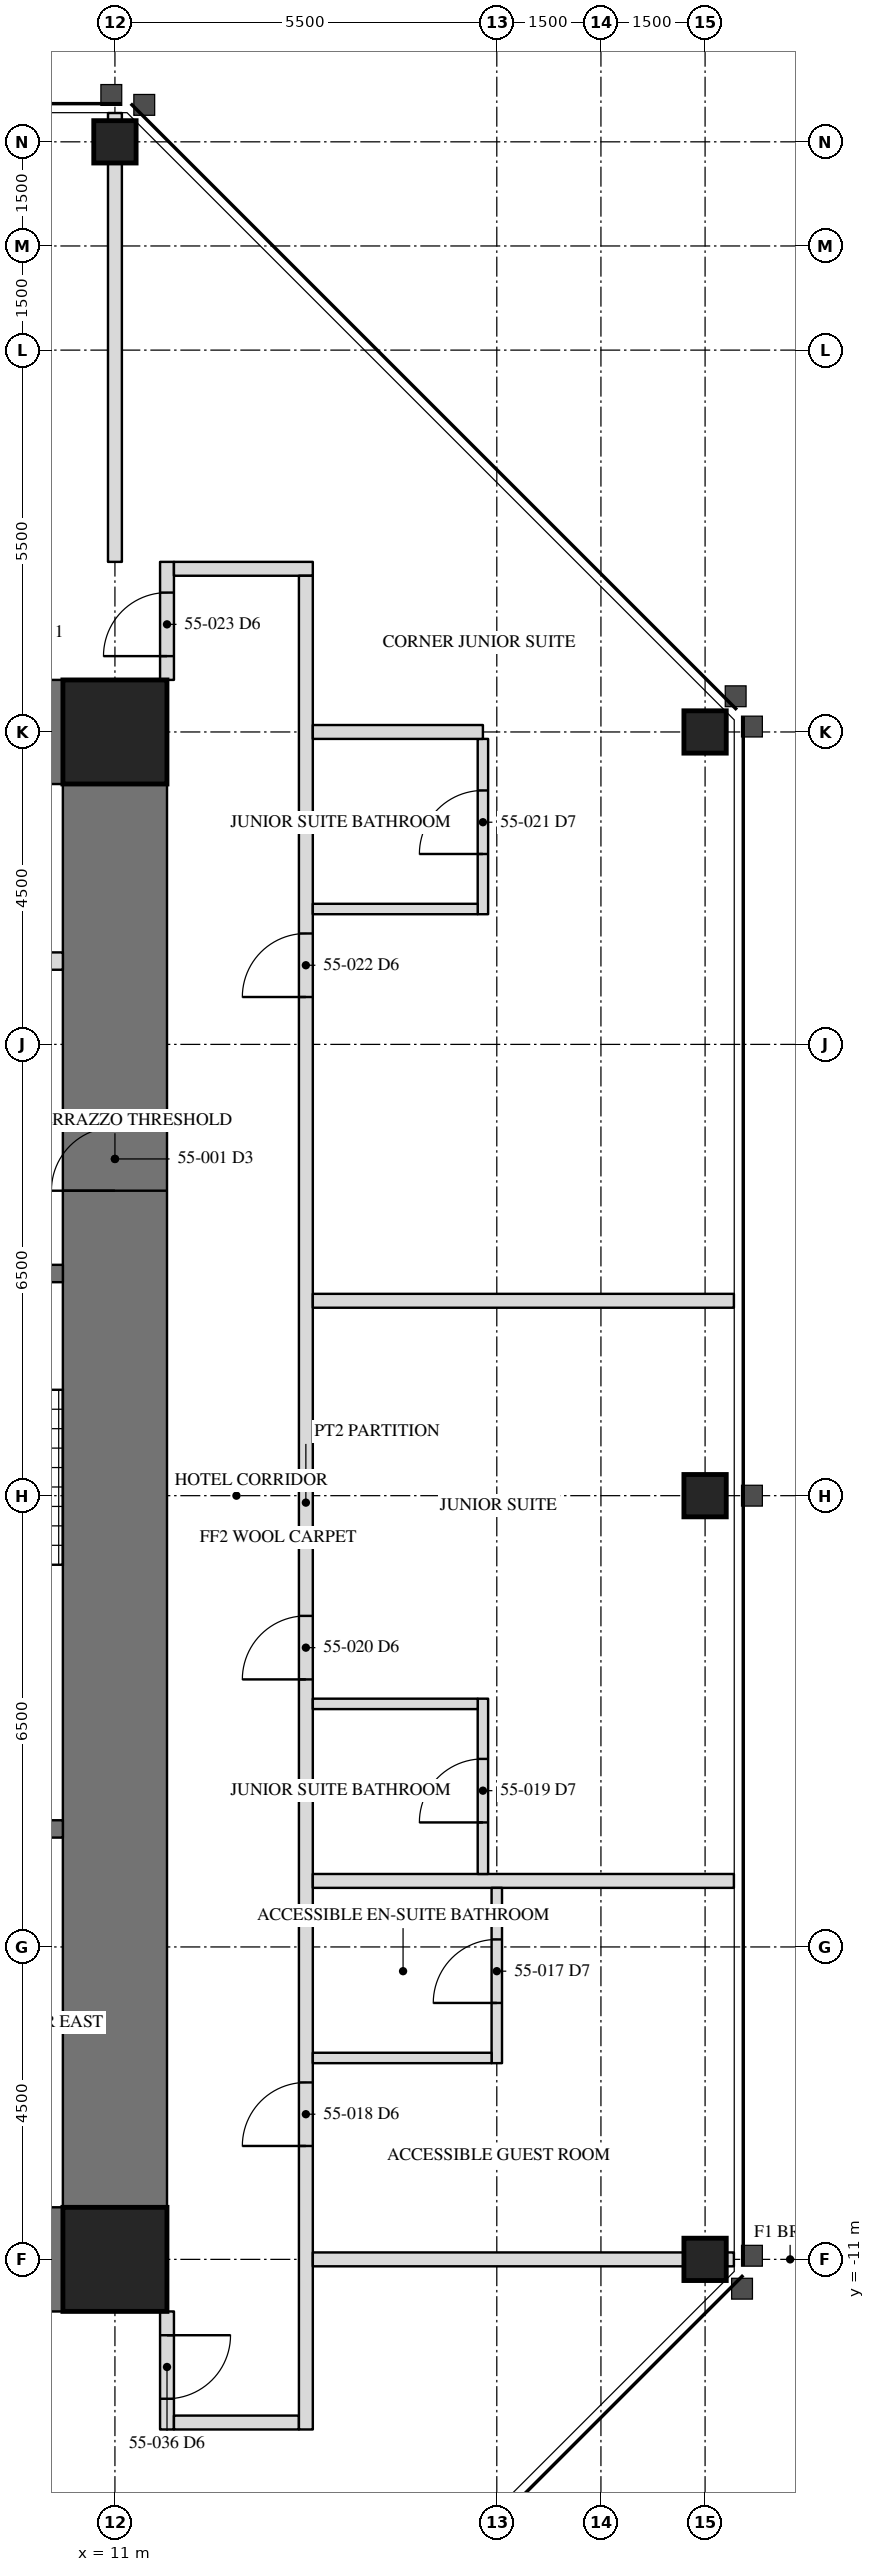
"""IFC4 building model, lengths in metres.
Left out: names, types, materials, properties, quantities, classifications, styles, units other than length and angle.
Written with IfcOpenShell. Run it as: python <this file> out.ifc"""

import sys

from ifc_helpers import new_model, si_unit, direction, frame, frame_2d, origin, origin_2d, place, context, subcontext, project, spatial, rectangle, hollow_rectangle, extrude, element, fill, save


model = new_model("IFC4")
c1 = context("Model", 3, precision=1e-05, world=origin(), true_north=direction((0.0, 1.0)))
c2 = subcontext(c1, "Body", "Model", "MODEL_VIEW")
j1 = project(units=[si_unit("LENGTHUNIT", "METRE"), si_unit("PLANEANGLEUNIT", "RADIAN")], contexts=[c1])
p1 = place(None, origin())
s1 = spatial("IfcSite", under=j1, at=p1, CompositionType="ELEMENT")
p2 = place(p1, origin())
s2 = spatial("IfcBuilding", under=s1, at=p2, CompositionType="ELEMENT")
p3 = place(p2, frame((0.0, 0.0, 229.2)))
s3 = spatial("IfcBuildingStorey", under=s2, at=p3, CompositionType="ELEMENT", Elevation=229.2)
for number, where, z_axis, x_axis in (
    (1, (19.5, -11.0, 0.0), (0.0, 0.0, 1.0), (0.0, 1.0, 0.0)),
    (2, (19.5, 0.0, 0.0), (0.0, 0.0, 1.0), (0.0, 1.0, 0.0)),
    (3, (19.5, 11.0, 0.0), (0.0, 0.0, 1.0), (0.0, 1.0, 0.0)),
    (4, (11.0, 19.5, 0.0), (0.0, 0.0, 1.0), (1.0, 0.0, 0.0)),
):
    element("IfcColumn", number, at=place(p3, frame(where, z_axis=z_axis, x_axis=x_axis)), inside=s3, PredefinedType="COLUMN", context=c2, shape_type="SweptSolid", body=[
        extrude(hollow_rectangle(XDim=0.61, YDim=0.61, WallThickness=0.076, at=origin_2d()), origin(), (0.0, 0.0, 1.0), 3.5),
    ])
p4 = place(p3, frame((11.0, -11.0, 0.0), z_axis=(0.0, 0.0, 1.0), x_axis=(0.0, 1.0, 0.0)))
e5 = element("IfcWall", 5, at=p4, inside=s3, PredefinedType="SHEAR", context=c2, shape_type="SweptSolid", body=[
    extrude(rectangle(XDim=22.0, YDim=1.5, at=frame_2d((11.0, 0.0))), origin(), (0.0, 0.0, 1.0), 3.5),
])
p5 = place(p4, frame((15.393, 0.0, 0.0)))
e6 = element("IfcOpeningElement", 6, at=p5, cuts=e5, PredefinedType="OPENING", context=c2, shape_type="SweptSolid", body=[
    extrude(rectangle(XDim=0.915, YDim=2.134, at=frame_2d((0.458, 1.067))), frame((0.0, 0.76, 0.0), z_axis=(0.0, -1.0, 0.0), x_axis=(1.0, 0.0, 0.0)), (0.0, 0.0, 1.0), 1.52),
])
for number, where, z_axis, x_axis in (
    (7, (11.0, 11.0, 0.0), (0.0, 0.0, 1.0), (-1.0, 0.0, 0.0)),
    (8, (6.5, -11.0, 0.0), (0.0, 0.0, 1.0), (1.0, 0.0, 0.0)),
):
    element("IfcWall", number, at=place(p3, frame(where, z_axis=z_axis, x_axis=x_axis)), inside=s3, PredefinedType="SHEAR", context=c2, shape_type="SweptSolid", body=[
        extrude(rectangle(XDim=4.5, YDim=1.5, at=frame_2d((2.25, 0.0))), origin(), (0.0, 0.0, 1.0), 3.5),
    ])
for number, where, z_axis, x_axis in (
    (9, (11.0, 11.0, 0.0), (0.0, 0.0, 1.0), (1.0, 0.0, 0.0)),
    (10, (11.0, -11.0, 0.0), (0.0, 0.0, 1.0), (1.0, 0.0, 0.0)),
):
    element("IfcColumn", number, at=place(p3, frame(where, z_axis=z_axis, x_axis=x_axis)), inside=s3, PredefinedType="COLUMN", context=c2, shape_type="SweptSolid", body=[
        extrude(hollow_rectangle(XDim=1.499, YDim=1.499, WallThickness=0.102, at=origin_2d()), origin(), (0.0, 0.0, 1.0), 3.5),
    ])
p6 = place(p3, frame((6.95, -4.8, 0.0), z_axis=(0.0, 0.0, 1.0), x_axis=(1.0, 0.0, 0.0)))
e11 = element("IfcWall", 11, at=p6, inside=s3, PredefinedType="SOLIDWALL", context=c2, shape_type="SweptSolid", body=[
    extrude(rectangle(XDim=3.3, YDim=0.25, at=frame_2d((1.65, 0.0))), origin(), (0.0, 0.0, 1.0), 3.31),
])
p7 = place(p3, frame((6.95, 3.2, 0.0), z_axis=(0.0, 0.0, 1.0), x_axis=(1.0, 0.0, 0.0)))
e12 = element("IfcWall", 12, at=p7, inside=s3, PredefinedType="SOLIDWALL", context=c2, shape_type="SweptSolid", body=[
    extrude(rectangle(XDim=3.3, YDim=0.25, at=frame_2d((1.65, 0.0))), origin(), (0.0, 0.0, 1.0), 3.31),
])
p8 = place(p7, frame((1.116, 0.0, 0.0)))
e13 = element("IfcOpeningElement", 13, at=p8, cuts=e12, PredefinedType="OPENING", context=c2, shape_type="SweptSolid", body=[
    extrude(rectangle(XDim=1.067, YDim=2.134, at=frame_2d((0.533, 1.067))), frame((0.0, 0.135, 0.0), z_axis=(0.0, -1.0, 0.0), x_axis=(1.0, 0.0, 0.0)), (0.0, 0.0, 1.0), 0.27),
])
p9 = place(p3, frame((6.95, 7.7, 0.0), z_axis=(0.0, 0.0, 1.0), x_axis=(1.0, 0.0, 0.0)))
e14 = element("IfcWall", 14, at=p9, inside=s3, PredefinedType="PARTITIONING", context=c2, shape_type="SweptSolid", body=[
    extrude(rectangle(XDim=3.3, YDim=0.25, at=frame_2d((1.65, 0.0))), origin(), (0.0, 0.0, 1.0), 3.31),
])
p10 = place(p9, frame((0.45, 0.0, 0.0)))
e15 = element("IfcOpeningElement", 15, at=p10, cuts=e14, PredefinedType="OPENING", context=c2, shape_type="SweptSolid", body=[
    extrude(rectangle(XDim=1.219, YDim=2.134, at=frame_2d((0.609, 1.067))), frame((0.0, 0.135, 0.0), z_axis=(0.0, -1.0, 0.0), x_axis=(1.0, 0.0, 0.0)), (0.0, 0.0, 1.0), 0.27),
])
p11 = place(p3, frame((11.75, 11.75, 0.0), z_axis=(0.0, 0.0, 1.0), x_axis=(0.0, 1.0, 0.0)))
e16 = element("IfcWall", 16, at=p11, inside=s3, PredefinedType="PARTITIONING", context=c2, shape_type="SweptSolid", body=[
    extrude(rectangle(XDim=1.7, YDim=0.2, at=frame_2d((0.85, 0.0))), origin(), (0.0, 0.0, 1.0), 3.31),
])
p12 = place(p11, frame((0.343, 0.0, 0.0)))
e17 = element("IfcOpeningElement", 17, at=p12, cuts=e16, PredefinedType="OPENING", context=c2, shape_type="SweptSolid", body=[
    extrude(rectangle(XDim=0.915, YDim=2.134, at=frame_2d((0.458, 1.067))), frame((0.0, 0.11, 0.0), z_axis=(0.0, -1.0, 0.0), x_axis=(1.0, 0.0, 0.0)), (0.0, 0.0, 1.0), 0.22),
])
p13 = place(p3, frame((13.85, 13.35, 0.0), z_axis=(0.0, 0.0, 1.0), x_axis=(-1.0, 0.0, 0.0)))
e18 = element("IfcWall", 18, at=p13, inside=s3, PredefinedType="PARTITIONING", context=c2, shape_type="SweptSolid", body=[
    extrude(rectangle(XDim=2.0, YDim=0.2, at=frame_2d((1.0, 0.0))), origin(), (0.0, 0.0, 1.0), 3.31),
])
p14 = place(p3, frame((11.75, -11.75, 0.0), z_axis=(0.0, 0.0, 1.0), x_axis=(0.0, -1.0, 0.0)))
e19 = element("IfcWall", 19, at=p14, inside=s3, PredefinedType="PARTITIONING", context=c2, shape_type="SweptSolid", body=[
    extrude(rectangle(XDim=1.7, YDim=0.2, at=frame_2d((0.85, 0.0))), origin(), (0.0, 0.0, 1.0), 3.31),
])
p15 = place(p14, frame((0.343, 0.0, 0.0)))
e20 = element("IfcOpeningElement", 20, at=p15, cuts=e19, PredefinedType="OPENING", context=c2, shape_type="SweptSolid", body=[
    extrude(rectangle(XDim=0.915, YDim=2.134, at=frame_2d((0.458, 1.067))), frame((0.0, 0.11, 0.0), z_axis=(0.0, -1.0, 0.0), x_axis=(1.0, 0.0, 0.0)), (0.0, 0.0, 1.0), 0.22),
])
p16 = place(p3, frame((11.85, -13.35, 0.0), z_axis=(0.0, 0.0, 1.0), x_axis=(1.0, 0.0, 0.0)))
e21 = element("IfcWall", 21, at=p16, inside=s3, PredefinedType="PARTITIONING", context=c2, shape_type="SweptSolid", body=[
    extrude(rectangle(XDim=1.8, YDim=0.2, at=frame_2d((0.9, 0.0))), origin(), (0.0, 0.0, 1.0), 3.31),
])
p17 = place(p3, frame((13.75, -13.45, 0.0), z_axis=(0.0, 0.0, 1.0), x_axis=(0.0, 1.0, 0.0)))
e22 = element("IfcWall", 22, at=p17, inside=s3, PredefinedType="PARTITIONING", context=c2, shape_type="SweptSolid", body=[
    extrude(rectangle(XDim=26.7, YDim=0.2, at=frame_2d((13.35, 0.0))), origin(), (0.0, 0.0, 1.0), 3.31),
])
p18 = place(p17, frame((4.083, 0.0, 0.0)))
e23 = element("IfcOpeningElement", 23, at=p18, cuts=e22, PredefinedType="OPENING", context=c2, shape_type="SweptSolid", body=[
    extrude(rectangle(XDim=0.915, YDim=2.134, at=frame_2d((0.458, 1.067))), frame((0.0, 0.11, 0.0), z_axis=(0.0, -1.0, 0.0), x_axis=(1.0, 0.0, 0.0)), (0.0, 0.0, 1.0), 0.22),
])
p19 = place(p17, frame((10.803, 0.0, 0.0)))
e24 = element("IfcOpeningElement", 24, at=p19, cuts=e22, PredefinedType="OPENING", context=c2, shape_type="SweptSolid", body=[
    extrude(rectangle(XDim=0.915, YDim=2.134, at=frame_2d((0.458, 1.067))), frame((0.0, 0.11, 0.0), z_axis=(0.0, -1.0, 0.0), x_axis=(1.0, 0.0, 0.0)), (0.0, 0.0, 1.0), 0.22),
])
p20 = place(p17, frame((20.633, 0.0, 0.0)))
e25 = element("IfcOpeningElement", 25, at=p20, cuts=e22, PredefinedType="OPENING", context=c2, shape_type="SweptSolid", body=[
    extrude(rectangle(XDim=0.915, YDim=2.134, at=frame_2d((0.458, 1.067))), frame((0.0, 0.11, 0.0), z_axis=(0.0, -1.0, 0.0), x_axis=(1.0, 0.0, 0.0)), (0.0, 0.0, 1.0), 0.22),
])
p21 = place(p3, frame((13.85, -11.0, 0.0), z_axis=(0.0, 0.0, 1.0), x_axis=(1.0, 0.0, 0.0)))
e26 = element("IfcWall", 26, at=p21, inside=s3, PredefinedType="PARTITIONING", context=c2, shape_type="SweptSolid", body=[
    extrude(rectangle(XDim=6.065, YDim=0.2, at=frame_2d((3.032, 0.0))), origin(), (0.0, 0.0, 1.0), 2.802),
])
for number, where, z_axis, x_axis in (
    (27, (13.85, -5.549, 0.0), (0.0, 0.0, 1.0), (1.0, 0.0, 0.0)),
    (28, (13.85, 2.807, 0.0), (0.0, 0.0, 1.0), (1.0, 0.0, 0.0)),
):
    element("IfcWall", number, at=place(p3, frame(where, z_axis=z_axis, x_axis=x_axis)), inside=s3, PredefinedType="PARTITIONING", context=c2, shape_type="SweptSolid", body=[
        extrude(rectangle(XDim=6.065, YDim=0.2, at=frame_2d((3.032, 0.0))), origin(), (0.0, 0.0, 1.0), 3.31),
    ])
p22 = place(p3, frame((16.5, -8.174, 0.0), z_axis=(0.0, 0.0, 1.0), x_axis=(0.0, 1.0, 0.0)))
e29 = element("IfcWall", 29, at=p22, inside=s3, PredefinedType="PARTITIONING", context=c2, shape_type="SweptSolid", body=[
    extrude(rectangle(XDim=2.525, YDim=0.15, at=frame_2d((1.263, 0.0))), origin(), (0.0, 0.0, 1.0), 3.31),
])
p23 = place(p22, frame((0.867, 0.0, 0.0)))
e30 = element("IfcOpeningElement", 30, at=p23, cuts=e29, PredefinedType="OPENING", context=c2, shape_type="SweptSolid", body=[
    extrude(rectangle(XDim=0.915, YDim=2.032, at=frame_2d((0.458, 1.016))), frame((0.0, 0.085, 0.0), z_axis=(0.0, -1.0, 0.0), x_axis=(1.0, 0.0, 0.0)), (0.0, 0.0, 1.0), 0.17),
])
p24 = place(p3, frame((13.85, -8.099, 0.0), z_axis=(0.0, 0.0, 1.0), x_axis=(1.0, 0.0, 0.0)))
e31 = element("IfcWall", 31, at=p24, inside=s3, PredefinedType="PARTITIONING", context=c2, shape_type="SweptSolid", body=[
    extrude(rectangle(XDim=2.575, YDim=0.15, at=frame_2d((1.288, 0.0))), origin(), (0.0, 0.0, 1.0), 3.31),
])
p25 = place(p3, frame((16.3, -5.449, 0.0), z_axis=(0.0, 0.0, 1.0), x_axis=(0.0, 1.0, 0.0)))
e32 = element("IfcWall", 32, at=p25, inside=s3, PredefinedType="PARTITIONING", context=c2, shape_type="SweptSolid", body=[
    extrude(rectangle(XDim=2.525, YDim=0.15, at=frame_2d((1.262, 0.0))), origin(), (0.0, 0.0, 1.0), 3.31),
])
p26 = place(p25, frame((0.742, 0.0, 0.0)))
e33 = element("IfcOpeningElement", 33, at=p26, cuts=e32, PredefinedType="OPENING", context=c2, shape_type="SweptSolid", body=[
    extrude(rectangle(XDim=0.915, YDim=2.032, at=frame_2d((0.458, 1.016))), frame((0.0, 0.085, 0.0), z_axis=(0.0, -1.0, 0.0), x_axis=(1.0, 0.0, 0.0)), (0.0, 0.0, 1.0), 0.17),
])
p27 = place(p3, frame((13.85, -2.999, 0.0), z_axis=(0.0, 0.0, 1.0), x_axis=(1.0, 0.0, 0.0)))
e34 = element("IfcWall", 34, at=p27, inside=s3, PredefinedType="PARTITIONING", context=c2, shape_type="SweptSolid", body=[
    extrude(rectangle(XDim=2.375, YDim=0.15, at=frame_2d((1.188, 0.0))), origin(), (0.0, 0.0, 1.0), 3.31),
])
p28 = place(p3, frame((16.3, 8.375, 0.0), z_axis=(0.0, 0.0, 1.0), x_axis=(0.0, 1.0, 0.0)))
e35 = element("IfcWall", 35, at=p28, inside=s3, PredefinedType="PARTITIONING", context=c2, shape_type="SweptSolid", body=[
    extrude(rectangle(XDim=2.525, YDim=0.15, at=frame_2d((1.262, 0.0))), origin(), (0.0, 0.0, 1.0), 3.31),
])
p29 = place(p28, frame((0.867, 0.0, 0.0)))
e36 = element("IfcOpeningElement", 36, at=p29, cuts=e35, PredefinedType="OPENING", context=c2, shape_type="SweptSolid", body=[
    extrude(rectangle(XDim=0.915, YDim=2.032, at=frame_2d((0.458, 1.016))), frame((0.0, 0.085, 0.0), z_axis=(0.0, -1.0, 0.0), x_axis=(1.0, 0.0, 0.0)), (0.0, 0.0, 1.0), 0.17),
])
p30 = place(p3, frame((13.85, 8.45, 0.0), z_axis=(0.0, 0.0, 1.0), x_axis=(1.0, 0.0, 0.0)))
e37 = element("IfcWall", 37, at=p30, inside=s3, PredefinedType="PARTITIONING", context=c2, shape_type="SweptSolid", body=[
    extrude(rectangle(XDim=2.375, YDim=0.15, at=frame_2d((1.188, 0.0))), origin(), (0.0, 0.0, 1.0), 3.31),
])
p31 = place(p3, frame((13.85, 11.0, 0.0), z_axis=(0.0, 0.0, 1.0), x_axis=(1.0, 0.0, 0.0)))
e38 = element("IfcWall", 38, at=p31, inside=s3, PredefinedType="PARTITIONING", context=c2, shape_type="SweptSolid", body=[
    extrude(rectangle(XDim=2.45, YDim=0.2, at=frame_2d((1.225, 0.0))), origin(), (0.0, 0.0, 1.0), 2.802),
])
p32 = place(p3, frame((11.0, 13.45, 0.0), z_axis=(0.0, 0.0, 1.0), x_axis=(0.0, 1.0, 0.0)))
e39 = element("IfcWall", 39, at=p32, inside=s3, PredefinedType="PARTITIONING", context=c2, shape_type="SweptSolid", body=[
    extrude(rectangle(XDim=6.465, YDim=0.2, at=frame_2d((3.232, 0.0))), origin(), (0.0, 0.0, 1.0), 2.802),
])
p33 = place(p5, origin())
e40 = element("IfcDoor", 40, at=p33, inside=s3, OperationType="SINGLE_SWING_RIGHT", PredefinedType="DOOR", context=c2, shape_type="SweptSolid", body=[
    extrude(rectangle(XDim=0.915, YDim=2.134, at=frame_2d((0.458, 1.067))), frame((0.0, -0.675, 0.0), z_axis=(0.0, -1.0, 0.0), x_axis=(1.0, 0.0, 0.0)), (0.0, 0.0, 1.0), 0.05),
])
fill(e6, e40)
p34 = place(p23, origin())
e41 = element("IfcDoor", 41, at=p34, inside=s3, OperationType="SINGLE_SWING_LEFT", PredefinedType="DOOR", context=c2, shape_type="SweptSolid", body=[
    extrude(rectangle(XDim=0.915, YDim=2.032, at=frame_2d((0.458, 1.016))), frame((0.0, 0.025, 0.0), z_axis=(0.0, -1.0, 0.0), x_axis=(1.0, 0.0, 0.0)), (0.0, 0.0, 1.0), 0.05),
])
fill(e30, e41)
p35 = place(p18, origin())
e42 = element("IfcDoor", 42, at=p35, inside=s3, OperationType="SINGLE_SWING_LEFT", PredefinedType="DOOR", context=c2, shape_type="SweptSolid", body=[
    extrude(rectangle(XDim=0.915, YDim=2.134, at=frame_2d((0.458, 1.067))), frame((0.0, 0.025, 0.0), z_axis=(0.0, -1.0, 0.0), x_axis=(1.0, 0.0, 0.0)), (0.0, 0.0, 1.0), 0.05),
])
fill(e23, e42)
p36 = place(p26, origin())
e43 = element("IfcDoor", 43, at=p36, inside=s3, OperationType="SINGLE_SWING_LEFT", PredefinedType="DOOR", context=c2, shape_type="SweptSolid", body=[
    extrude(rectangle(XDim=0.915, YDim=2.032, at=frame_2d((0.458, 1.016))), frame((0.0, 0.025, 0.0), z_axis=(0.0, -1.0, 0.0), x_axis=(1.0, 0.0, 0.0)), (0.0, 0.0, 1.0), 0.05),
])
fill(e33, e43)
p37 = place(p19, origin())
e44 = element("IfcDoor", 44, at=p37, inside=s3, OperationType="SINGLE_SWING_LEFT", PredefinedType="DOOR", context=c2, shape_type="SweptSolid", body=[
    extrude(rectangle(XDim=0.915, YDim=2.134, at=frame_2d((0.458, 1.067))), frame((0.0, 0.025, 0.0), z_axis=(0.0, -1.0, 0.0), x_axis=(1.0, 0.0, 0.0)), (0.0, 0.0, 1.0), 0.05),
])
fill(e24, e44)
p38 = place(p29, origin())
e45 = element("IfcDoor", 45, at=p38, inside=s3, OperationType="SINGLE_SWING_LEFT", PredefinedType="DOOR", context=c2, shape_type="SweptSolid", body=[
    extrude(rectangle(XDim=0.915, YDim=2.032, at=frame_2d((0.458, 1.016))), frame((0.0, 0.025, 0.0), z_axis=(0.0, -1.0, 0.0), x_axis=(1.0, 0.0, 0.0)), (0.0, 0.0, 1.0), 0.05),
])
fill(e36, e45)
p39 = place(p20, origin())
e46 = element("IfcDoor", 46, at=p39, inside=s3, OperationType="SINGLE_SWING_LEFT", PredefinedType="DOOR", context=c2, shape_type="SweptSolid", body=[
    extrude(rectangle(XDim=0.915, YDim=2.134, at=frame_2d((0.458, 1.067))), frame((0.0, 0.025, 0.0), z_axis=(0.0, -1.0, 0.0), x_axis=(1.0, 0.0, 0.0)), (0.0, 0.0, 1.0), 0.05),
])
fill(e25, e46)
p40 = place(p12, origin())
e47 = element("IfcDoor", 47, at=p40, inside=s3, OperationType="SINGLE_SWING_LEFT", PredefinedType="DOOR", context=c2, shape_type="SweptSolid", body=[
    extrude(rectangle(XDim=0.915, YDim=2.134, at=frame_2d((0.458, 1.067))), frame((0.0, 0.025, 0.0), z_axis=(0.0, -1.0, 0.0), x_axis=(1.0, 0.0, 0.0)), (0.0, 0.0, 1.0), 0.05),
])
fill(e17, e47)
p41 = place(p15, origin())
e48 = element("IfcDoor", 48, at=p41, inside=s3, OperationType="SINGLE_SWING_LEFT", PredefinedType="DOOR", context=c2, shape_type="SweptSolid", body=[
    extrude(rectangle(XDim=0.915, YDim=2.134, at=frame_2d((0.458, 1.067))), frame((0.0, 0.025, 0.0), z_axis=(0.0, -1.0, 0.0), x_axis=(1.0, 0.0, 0.0)), (0.0, 0.0, 1.0), 0.05),
])
fill(e20, e48)
save(model, sys.argv[1])
